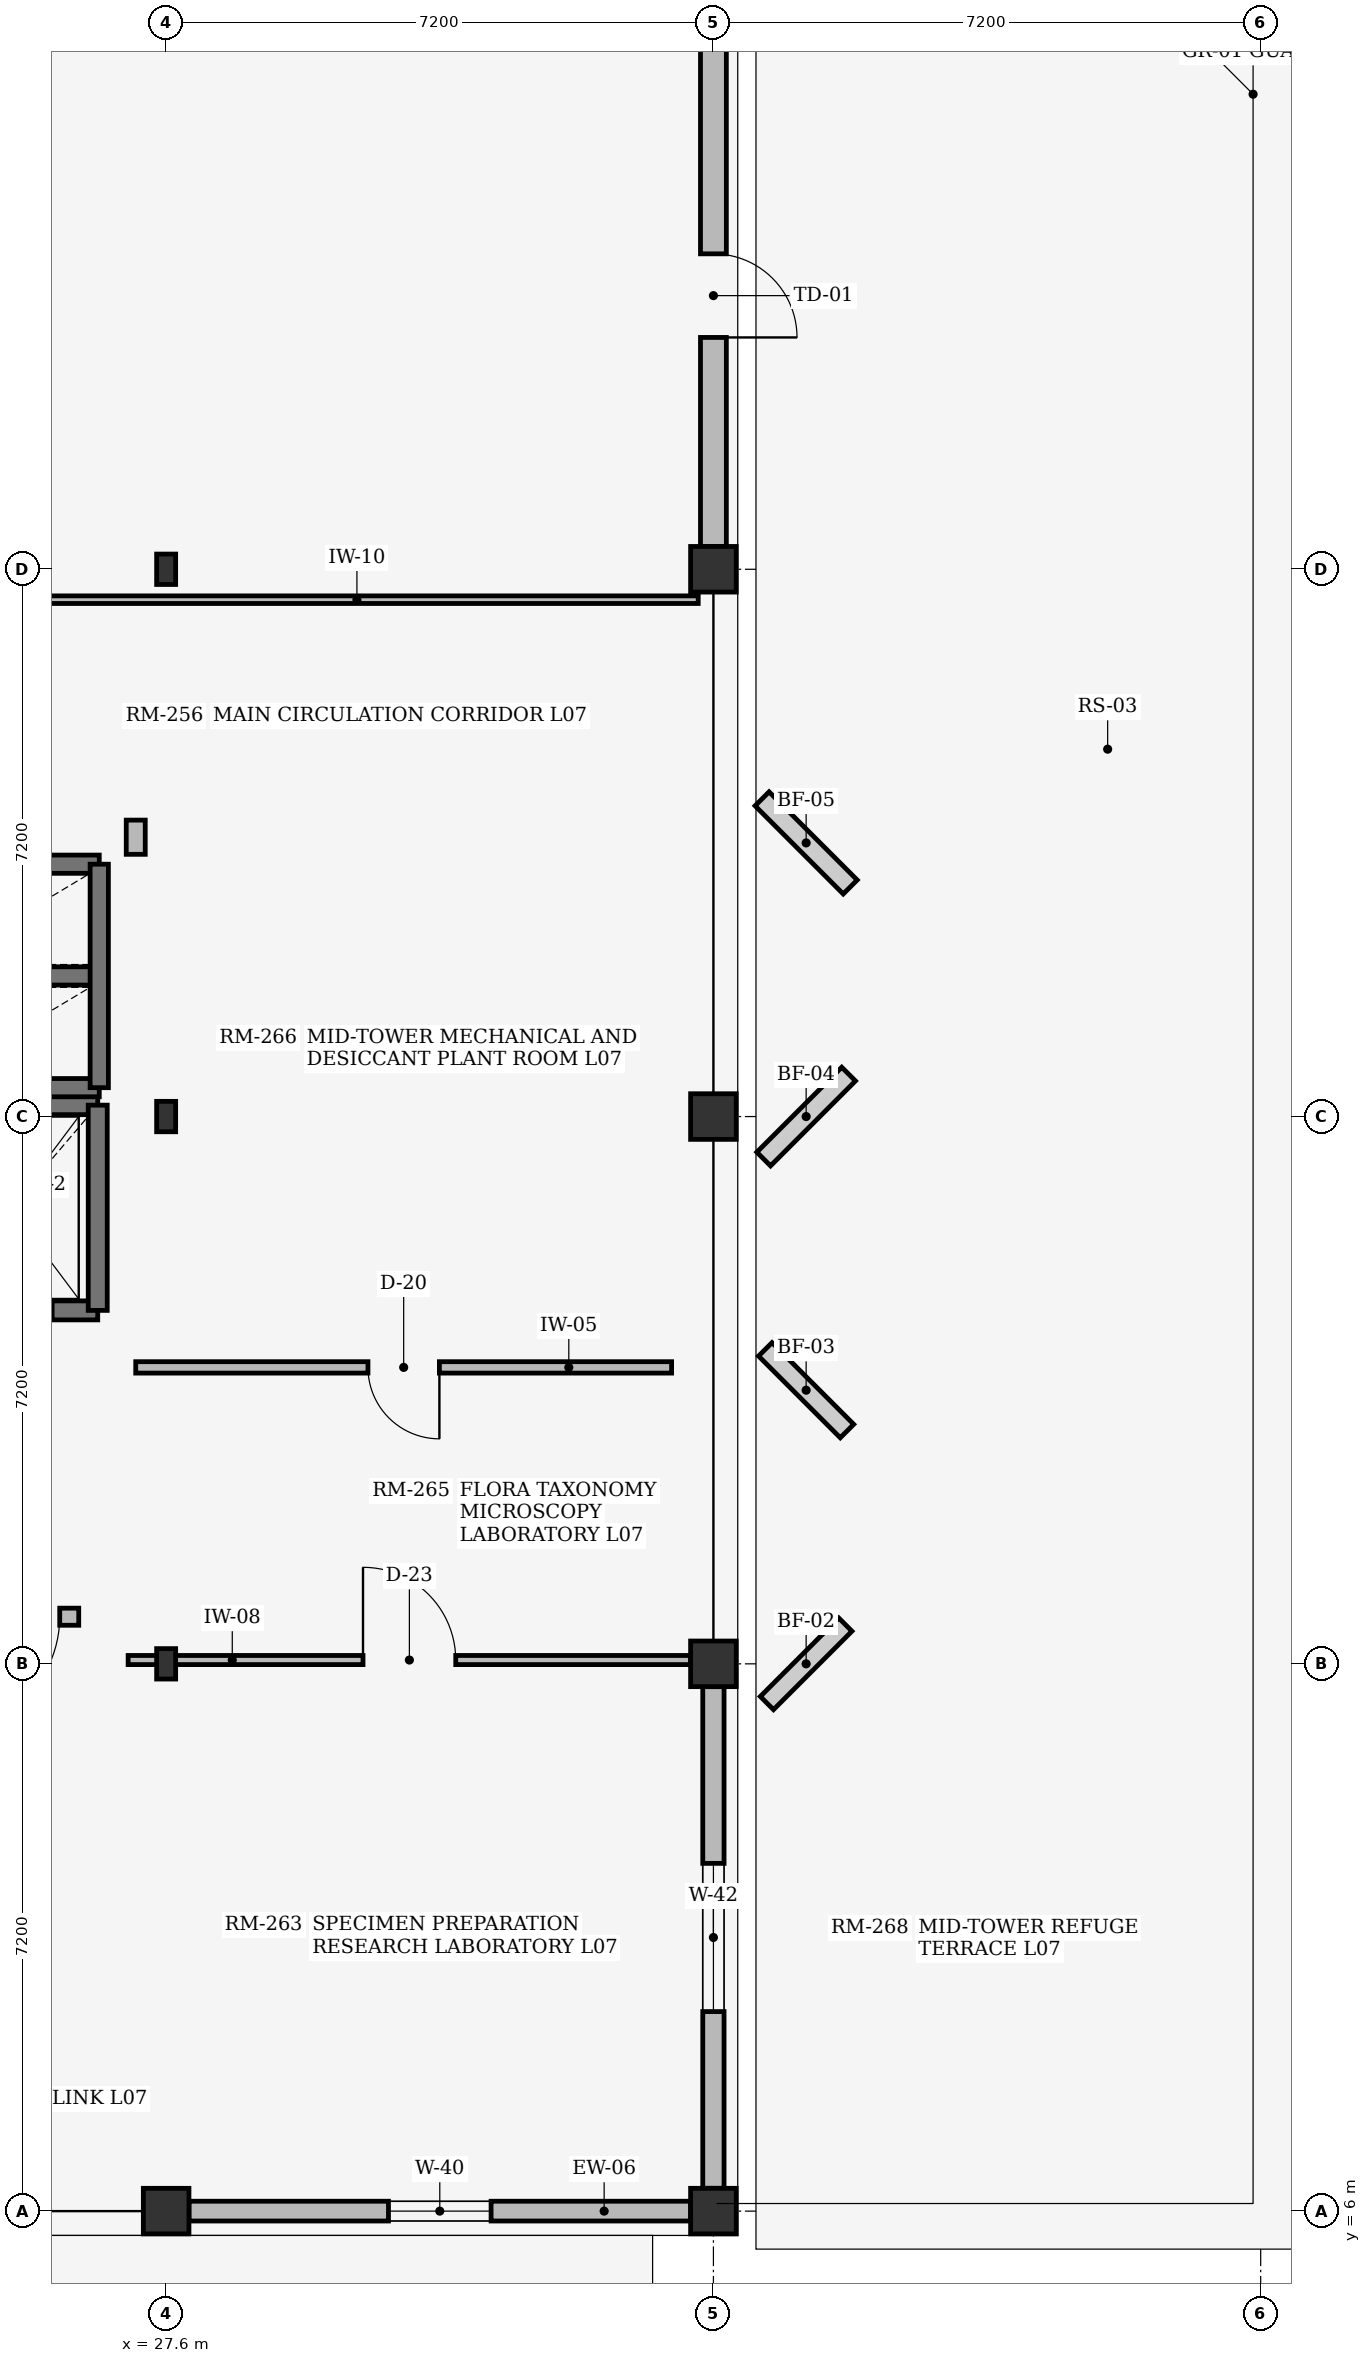
"""IFC4 building model, lengths in metres.
Left out: names, types, materials, properties, quantities, classifications, styles, units other than length and angle.
Written with IfcOpenShell. Run it as: python <this file> out.ifc"""

import sys

from ifc_helpers import new_model, si_unit, direction, frame, frame_2d, origin, origin_2d, place, context, subcontext, project, spatial, rectangle, i_section, extrude, element, fill, save


model = new_model("IFC4")
c1 = context("Model", 3, precision=1e-05, world=origin(), true_north=direction((0.0, 1.0)))
c2 = subcontext(c1, "Body", "Model", "MODEL_VIEW")
j1 = project(units=[si_unit("LENGTHUNIT", "METRE"), si_unit("PLANEANGLEUNIT", "RADIAN")], contexts=[c1])
p1 = place(None, origin())
s1 = spatial("IfcSite", under=j1, at=p1, CompositionType="ELEMENT")
p2 = place(p1, origin())
s2 = spatial("IfcBuilding", under=s1, at=p2, CompositionType="ELEMENT")
p3 = place(p2, frame((0.0, 0.0, 28.8)))
s3 = spatial("IfcBuildingStorey", under=s2, at=p3, CompositionType="ELEMENT", Elevation=28.8)
p4 = place(p3, frame((27.6, 6.0, 0.0), z_axis=(0.0, 0.0, 1.0), x_axis=(1.0, 0.0, 0.0)))
e1 = element("IfcColumn", 1, at=p4, inside=s3, PredefinedType="COLUMN", context=c2, shape_type="SweptSolid", body=[
    extrude(rectangle(XDim=0.6, YDim=0.6, at=origin_2d()), origin(), (0.0, 0.0, 1.0), 3.62),
])
for number, where, z_axis, x_axis in (
    (2, (27.6, 13.2, 0.0), (0.0, 0.0, 1.0), (1.0, 0.0, 0.0)),
    (3, (27.6, 20.4, 0.0), (0.0, 0.0, 1.0), (1.0, 0.0, 0.0)),
    (4, (27.6, 27.6, 0.0), (0.0, 0.0, 1.0), (1.0, 0.0, 0.0)),
):
    element("IfcColumn", number, at=place(p3, frame(where, z_axis=z_axis, x_axis=x_axis)), inside=s3, PredefinedType="COLUMN", context=c2, shape_type="SweptSolid", body=[
        extrude(i_section(OverallWidth=0.25, OverallDepth=0.4, WebThickness=0.01, FlangeThickness=0.013, at=origin_2d()), origin(), (0.0, 0.0, 1.0), 3.62),
    ])
for number, where, z_axis, x_axis in (
    (5, (34.8, 6.0, 0.0), (0.0, 0.0, 1.0), (1.0, 0.0, 0.0)),
    (6, (34.8, 13.2, 0.0), (0.0, 0.0, 1.0), (1.0, 0.0, 0.0)),
    (7, (34.8, 20.4, 0.0), (0.0, 0.0, 1.0), (1.0, 0.0, 0.0)),
    (8, (34.8, 27.6, 0.0), (0.0, 0.0, 1.0), (1.0, 0.0, 0.0)),
):
    element("IfcColumn", number, at=place(p3, frame(where, z_axis=z_axis, x_axis=x_axis)), inside=s3, PredefinedType="COLUMN", context=c2, shape_type="SweptSolid", body=[
        extrude(rectangle(XDim=0.6, YDim=0.6, at=origin_2d()), origin(), (0.0, 0.0, 1.0), 3.62),
    ])
p5 = place(p3, frame((27.9, 6.0, 0.0), z_axis=(0.0, 0.0, 1.0), x_axis=(1.0, 0.0, 0.0)))
e9 = element("IfcWall", 9, at=p5, inside=s3, PredefinedType="STANDARD", context=c2, shape_type="SweptSolid", body=[
    extrude(rectangle(XDim=6.6, YDim=0.26, at=frame_2d((3.3, 0.0))), origin(), (0.0, 0.0, 1.0), 3.1),
])
p6 = place(p5, frame((2.625, 0.0, 0.75)))
e10 = element("IfcOpeningElement", 10, at=p6, cuts=e9, PredefinedType="OPENING", context=c2, shape_type="SweptSolid", body=[
    extrude(rectangle(XDim=1.35, YDim=1.5, at=frame_2d((0.675, 0.75))), frame((0.0, 0.14, 0.0), z_axis=(0.0, -1.0, 0.0), x_axis=(1.0, 0.0, 0.0)), (0.0, 0.0, 1.0), 0.28),
])
p7 = place(p3, frame((34.8, 6.3, 0.0), z_axis=(0.0, 0.0, 1.0), x_axis=(0.0, 1.0, 0.0)))
e11 = element("IfcWall", 11, at=p7, inside=s3, PredefinedType="STANDARD", context=c2, shape_type="SweptSolid", body=[
    extrude(rectangle(XDim=6.6, YDim=0.28, at=frame_2d((3.3, 0.0))), origin(), (0.0, 0.0, 1.0), 3.1),
])
p8 = place(p7, frame((2.325, 0.0, 0.75)))
e12 = element("IfcOpeningElement", 12, at=p8, cuts=e11, PredefinedType="OPENING", context=c2, shape_type="SweptSolid", body=[
    extrude(rectangle(XDim=1.95, YDim=1.5, at=frame_2d((0.975, 0.75))), frame((0.0, 0.15, 0.0), z_axis=(0.0, -1.0, 0.0), x_axis=(1.0, 0.0, 0.0)), (0.0, 0.0, 1.0), 0.3),
])
p9 = place(p3, frame((34.8, 27.9, 0.0), z_axis=(0.0, 0.0, 1.0), x_axis=(0.0, 1.0, 0.0)))
e13 = element("IfcWall", 13, at=p9, inside=s3, PredefinedType="STANDARD", context=c2, shape_type="SweptSolid", body=[
    extrude(rectangle(XDim=6.6, YDim=0.34, at=frame_2d((3.3, 0.0))), origin(), (0.0, 0.0, 1.0), 3.1),
])
p10 = place(p9, frame((2.75, 0.0, 0.0)))
e14 = element("IfcOpeningElement", 14, at=p10, cuts=e13, PredefinedType="OPENING", context=c2, shape_type="SweptSolid", body=[
    extrude(rectangle(XDim=1.1, YDim=2.15, at=frame_2d((0.55, 1.075))), frame((0.0, 0.18, 0.0), z_axis=(0.0, -1.0, 0.0), x_axis=(1.0, 0.0, 0.0)), (0.0, 0.0, 1.0), 0.36),
])
p11 = place(p3, frame((24.4, 17.85, 0.0), z_axis=(0.0, 0.0, 1.0), x_axis=(1.0, 0.0, 0.0)))
e15 = element("IfcWall", 15, at=p11, inside=s3, PredefinedType="SHEAR", context=c2, shape_type="SweptSolid", body=[
    extrude(rectangle(XDim=2.3, YDim=0.25, at=frame_2d((1.15, 0.0))), origin(), (0.0, 0.0, 1.0), 3.62),
])
p12 = place(p11, frame((0.6, 0.0, 0.0)))
e16 = element("IfcOpeningElement", 16, at=p12, cuts=e15, PredefinedType="OPENING", context=c2, shape_type="SweptSolid", body=[
    extrude(rectangle(XDim=1.1, YDim=2.2, at=frame_2d((0.55, 1.1))), frame((0.0, 0.135, 0.0), z_axis=(0.0, -1.0, 0.0), x_axis=(1.0, 0.0, 0.0)), (0.0, 0.0, 1.0), 0.27),
])
p13 = place(p3, frame((24.4, 20.55, 0.0), z_axis=(0.0, 0.0, 1.0), x_axis=(1.0, 0.0, 0.0)))
e17 = element("IfcWall", 17, at=p13, inside=s3, PredefinedType="SHEAR", context=c2, shape_type="SweptSolid", body=[
    extrude(rectangle(XDim=2.3, YDim=0.25, at=frame_2d((1.15, 0.0))), origin(), (0.0, 0.0, 1.0), 3.62),
])
p14 = place(p3, frame((26.7, 17.85, 0.0), z_axis=(0.0, 0.0, 1.0), x_axis=(0.0, 1.0, 0.0)))
e18 = element("IfcWall", 18, at=p14, inside=s3, PredefinedType="SHEAR", context=c2, shape_type="SweptSolid", body=[
    extrude(rectangle(XDim=2.7, YDim=0.25, at=frame_2d((1.35, 0.0))), origin(), (0.0, 0.0, 1.0), 3.62),
])
for number, where, z_axis, x_axis in (
    (19, (24.48, 20.78, 0.0), (0.0, 0.0, 1.0), (1.0, 0.0, 0.0)),
    (20, (24.48, 22.25, 0.0), (0.0, 0.0, 1.0), (1.0, 0.0, 0.0)),
    (21, (24.48, 23.72, 0.0), (0.0, 0.0, 1.0), (1.0, 0.0, 0.0)),
):
    element("IfcWall", number, at=place(p3, frame(where, z_axis=z_axis, x_axis=x_axis)), inside=s3, PredefinedType="SHEAR", context=c2, shape_type="SweptSolid", body=[
        extrude(rectangle(XDim=2.24, YDim=0.24, at=frame_2d((1.12, 0.0))), origin(), (0.0, 0.0, 1.0), 3.62),
    ])
p15 = place(p3, frame((26.72, 20.78, 0.0), z_axis=(0.0, 0.0, 1.0), x_axis=(0.0, 1.0, 0.0)))
e22 = element("IfcWall", 22, at=p15, inside=s3, PredefinedType="SHEAR", context=c2, shape_type="SweptSolid", body=[
    extrude(rectangle(XDim=2.94, YDim=0.24, at=frame_2d((1.47, 0.0))), origin(), (0.0, 0.0, 1.0), 3.62),
])
p16 = place(p3, frame((24.45, 13.82, 0.0), z_axis=(0.0, 0.0, 1.0), x_axis=(1.0, 0.0, 0.0)))
e23 = element("IfcWall", 23, at=p16, inside=s3, PredefinedType="SOLIDWALL", context=c2, shape_type="SweptSolid", body=[
    extrude(rectangle(XDim=2.0, YDim=0.225, at=frame_2d((1.0, 0.0))), origin(), (0.0, 0.0, 1.0), 3.6),
])
p17 = place(p16, frame((0.25, 0.0, 0.0)))
e24 = element("IfcOpeningElement", 24, at=p17, cuts=e23, PredefinedType="OPENING", context=c2, shape_type="SweptSolid", body=[
    extrude(rectangle(XDim=1.5, YDim=2.2, at=frame_2d((0.75, 1.1))), frame((0.0, 0.123, 0.0), z_axis=(0.0, -1.0, 0.0), x_axis=(1.0, 0.0, 0.0)), (0.0, 0.0, 1.0), 0.245),
])
p18 = place(p3, frame((27.2, 17.1, 0.0), z_axis=(0.0, 0.0, 1.0), x_axis=(1.0, 0.0, 0.0)))
e25 = element("IfcWall", 25, at=p18, inside=s3, PredefinedType="PARTITIONING", context=c2, shape_type="SweptSolid", body=[
    extrude(rectangle(XDim=7.05, YDim=0.15, at=frame_2d((3.525, 0.0))), origin(), (0.0, 0.0, 1.0), 3.6),
])
p19 = place(p18, frame((3.055, 0.0, 0.0)))
e26 = element("IfcOpeningElement", 26, at=p19, cuts=e25, PredefinedType="OPENING", context=c2, shape_type="SweptSolid", body=[
    extrude(rectangle(XDim=0.94, YDim=2.18, at=frame_2d((0.47, 1.09))), frame((0.0, 0.085, 0.0), z_axis=(0.0, -1.0, 0.0), x_axis=(1.0, 0.0, 0.0)), (0.0, 0.0, 1.0), 0.17),
])
p20 = place(p3, frame((27.1, 13.25, 0.0), z_axis=(0.0, 0.0, 1.0), x_axis=(1.0, 0.0, 0.0)))
e27 = element("IfcWall", 27, at=p20, inside=s3, PredefinedType="PARTITIONING", context=c2, shape_type="SweptSolid", body=[
    extrude(rectangle(XDim=7.4, YDim=0.12, at=frame_2d((3.7, 0.0))), origin(), (0.0, 0.0, 1.0), 3.11),
])
p21 = place(p20, frame((3.09, 0.0, 0.0)))
e28 = element("IfcOpeningElement", 28, at=p21, cuts=e27, PredefinedType="OPENING", context=c2, shape_type="SweptSolid", body=[
    extrude(rectangle(XDim=1.22, YDim=2.22, at=frame_2d((0.61, 1.11))), frame((0.0, 0.07, 0.0), z_axis=(0.0, -1.0, 0.0), x_axis=(1.0, 0.0, 0.0)), (0.0, 0.0, 1.0), 0.14),
])
p22 = place(p3, frame((27.2, 24.3, 0.0), z_axis=(0.0, 0.0, 1.0), x_axis=(0.0, -1.0, 0.0)))
e29 = element("IfcWall", 29, at=p22, inside=s3, PredefinedType="SOLIDWALL", context=c2, shape_type="SweptSolid", body=[
    extrude(rectangle(XDim=0.45, YDim=0.25, at=frame_2d((0.225, 0.0))), origin(), (0.0, 0.0, 1.0), 3.6),
])
p23 = place(p3, frame((14.5, 27.2, 0.0), z_axis=(0.0, 0.0, 1.0), x_axis=(1.0, 0.0, 0.0)))
e30 = element("IfcWall", 30, at=p23, inside=s3, PredefinedType="PARTITIONING", context=c2, shape_type="SweptSolid", body=[
    extrude(rectangle(XDim=20.1, YDim=0.1, at=frame_2d((10.05, 0.0))), origin(), (0.0, 0.0, 1.0), 3.6),
])
p24 = place(p23, frame((9.33, 0.0, 0.0)))
e31 = element("IfcOpeningElement", 31, at=p24, cuts=e30, PredefinedType="OPENING", context=c2, shape_type="SweptSolid", body=[
    extrude(rectangle(XDim=1.44, YDim=2.24, at=frame_2d((0.72, 1.12))), frame((0.0, 0.06, 0.0), z_axis=(0.0, -1.0, 0.0), x_axis=(1.0, 0.0, 0.0)), (0.0, 0.0, 1.0), 0.12),
])
p25 = place(p6, origin())
e32 = element("IfcWindow", 32, at=p25, inside=s3, PartitioningType="SINGLE_PANEL", PredefinedType="WINDOW", context=c2, shape_type="SweptSolid", body=[
    extrude(rectangle(XDim=1.35, YDim=1.5, at=frame_2d((0.675, 0.75))), frame((0.0, 0.03, 0.0), z_axis=(0.0, -1.0, 0.0), x_axis=(1.0, 0.0, 0.0)), (0.0, 0.0, 1.0), 0.06),
])
fill(e10, e32)
p26 = place(p8, origin())
e33 = element("IfcWindow", 33, at=p26, inside=s3, PartitioningType="SINGLE_PANEL", PredefinedType="WINDOW", context=c2, shape_type="SweptSolid", body=[
    extrude(rectangle(XDim=1.95, YDim=1.5, at=frame_2d((0.975, 0.75))), frame((0.0, 0.03, 0.0), z_axis=(0.0, -1.0, 0.0), x_axis=(1.0, 0.0, 0.0)), (0.0, 0.0, 1.0), 0.06),
])
fill(e12, e33)
p27 = place(p10, frame((1.1, 0.0, 0.0), z_axis=(0.0, 0.0, 1.0), x_axis=(-1.0, 0.0, 0.0)))
e34 = element("IfcDoor", 34, at=p27, inside=s3, OperationType="SINGLE_SWING_LEFT", PredefinedType="DOOR", context=c2, shape_type="SweptSolid", body=[
    extrude(rectangle(XDim=1.1, YDim=2.15, at=frame_2d((0.55, 1.075))), frame((0.0, 0.025, 0.0), z_axis=(0.0, -1.0, 0.0), x_axis=(1.0, 0.0, 0.0)), (0.0, 0.0, 1.0), 0.05),
])
fill(e14, e34)
p28 = place(p17, frame((1.5, 0.0, 0.0), z_axis=(0.0, 0.0, 1.0), x_axis=(-1.0, 0.0, 0.0)))
e35 = element("IfcDoor", 35, at=p28, inside=s3, OperationType="SINGLE_SWING_LEFT", PredefinedType="DOOR", context=c2, shape_type="SweptSolid", body=[
    extrude(rectangle(XDim=1.5, YDim=2.2, at=frame_2d((0.75, 1.1))), frame((0.0, 0.025, 0.0), z_axis=(0.0, -1.0, 0.0), x_axis=(1.0, 0.0, 0.0)), (0.0, 0.0, 1.0), 0.05),
])
fill(e24, e35)
p29 = place(p19, origin())
e36 = element("IfcDoor", 36, at=p29, inside=s3, OperationType="SINGLE_SWING_RIGHT", PredefinedType="DOOR", context=c2, shape_type="SweptSolid", body=[
    extrude(rectangle(XDim=0.94, YDim=2.18, at=frame_2d((0.47, 1.09))), frame((0.0, 0.025, 0.0), z_axis=(0.0, -1.0, 0.0), x_axis=(1.0, 0.0, 0.0)), (0.0, 0.0, 1.0), 0.05),
])
fill(e26, e36)
p30 = place(p21, origin())
e37 = element("IfcDoor", 37, at=p30, inside=s3, OperationType="SINGLE_SWING_LEFT", PredefinedType="DOOR", context=c2, shape_type="SweptSolid", body=[
    extrude(rectangle(XDim=1.22, YDim=2.22, at=frame_2d((0.61, 1.11))), frame((0.0, 0.025, 0.0), z_axis=(0.0, -1.0, 0.0), x_axis=(1.0, 0.0, 0.0)), (0.0, 0.0, 1.0), 0.05),
])
fill(e28, e37)
save(model, sys.argv[1])
